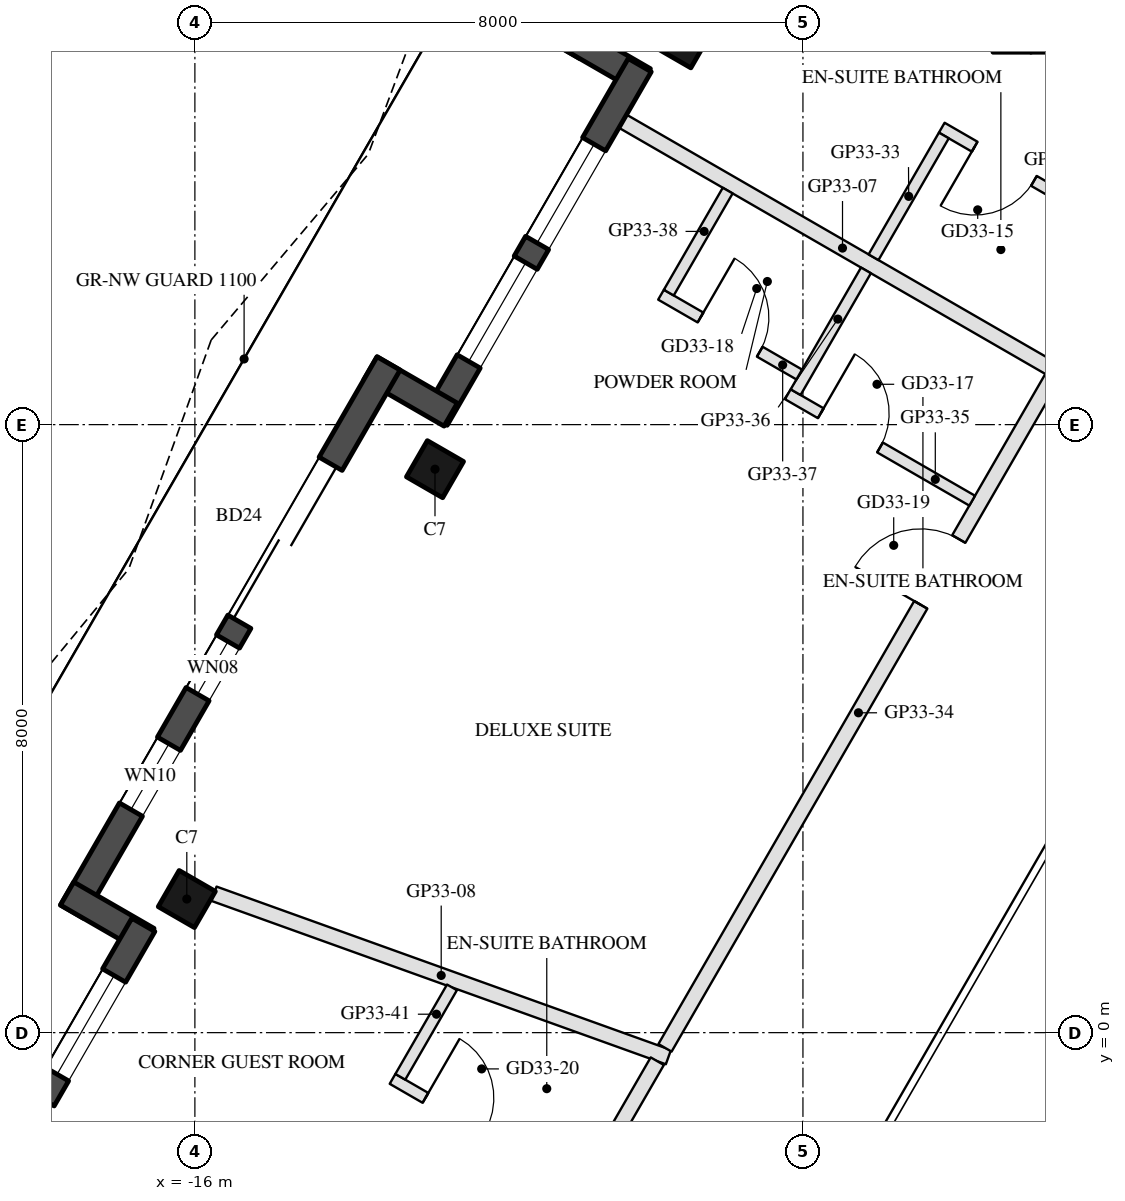
"""IFC4 building model, lengths in metres.
Left out: names, types, materials, properties, quantities, classifications, styles, units other than length and angle.
Written with IfcOpenShell. Run it as: python <this file> out.ifc"""

import sys

from ifc_helpers import new_model, si_unit, direction, frame, frame_2d, origin, origin_2d, place, context, subcontext, project, spatial, rectangle, hollow_rectangle, extrude, boolean, halfspace, element, fill, save


model = new_model("IFC4")
c1 = context("Model", 3, precision=1e-05, world=origin(), true_north=direction((0.0, 1.0)))
c2 = subcontext(c1, "Body", "Model", "MODEL_VIEW")
j1 = project(units=[si_unit("LENGTHUNIT", "METRE"), si_unit("PLANEANGLEUNIT", "RADIAN")], contexts=[c1])
p1 = place(None, origin())
s1 = spatial("IfcSite", under=j1, at=p1, CompositionType="ELEMENT")
p2 = place(p1, origin())
s2 = spatial("IfcBuilding", under=s1, at=p2, CompositionType="ELEMENT")
p3 = place(p2, frame((0.0, 0.0, 313.3)))
s3 = spatial("IfcBuildingStorey", under=s2, at=p3, CompositionType="ELEMENT", Elevation=313.3)
p4 = place(p3, frame((-9.576, 13.07, 0.0), z_axis=(0.0, 0.0, 1.0), x_axis=(0.5, 0.866025403784, 0.0)))
e1 = element("IfcColumn", 1, at=p4, inside=s3, PredefinedType="COLUMN", context=c2, shape_type="SweptSolid", body=[
    boolean("DIFFERENCE", extrude(hollow_rectangle(XDim=0.55, YDim=0.55, WallThickness=0.025, at=origin_2d()), origin(), (0.0, 0.0, 1.0), 3.7), halfspace(frame((0.0, 0.0, 0.034), z_axis=(0.0, 0.0, 1.0), x_axis=(1.0, 0.0, 0.0)), True)),
])
p5 = place(p3, frame((-12.841, 7.414, 0.0), z_axis=(0.0, 0.0, 1.0), x_axis=(0.5, 0.866025403784, 0.0)))
e2 = element("IfcColumn", 2, at=p5, inside=s3, PredefinedType="COLUMN", context=c2, shape_type="SweptSolid", body=[
    boolean("DIFFERENCE", extrude(hollow_rectangle(XDim=0.55, YDim=0.55, WallThickness=0.025, at=origin_2d()), origin(), (0.0, 0.0, 1.0), 3.7), halfspace(frame((0.0, 0.0, 0.031), z_axis=(0.0, 0.0, 1.0), x_axis=(1.0, 0.0, 0.0)), True)),
])
p6 = place(p3, frame((-16.106, 1.758, 0.0), z_axis=(0.0, 0.0, 1.0), x_axis=(0.5, 0.866025403784, 0.0)))
e3 = element("IfcColumn", 3, at=p6, inside=s3, PredefinedType="COLUMN", context=c2, shape_type="SweptSolid", body=[
    boolean("DIFFERENCE", extrude(hollow_rectangle(XDim=0.55, YDim=0.55, WallThickness=0.025, at=origin_2d()), origin(), (0.0, 0.0, 1.0), 3.7), halfspace(frame((0.0, 0.0, 0.034), z_axis=(0.0, 0.0, 1.0), x_axis=(1.0, 0.0, 0.0)), True)),
])
p7 = place(p3, frame((-6.125, 21.497, 0.0), z_axis=(0.0, 0.0, 1.0), x_axis=(-0.500002137087, -0.866024169933, 0.0)))
e4 = element("IfcWall", 4, at=p7, inside=s3, PredefinedType="SOLIDWALL", context=c2, shape_type="SweptSolid", body=[
    extrude(rectangle(XDim=9.924, YDim=0.35, at=frame_2d((4.962, 0.0))), origin(), (0.0, 0.0, 1.0), 3.55),
])
p8 = place(p7, frame((0.381, 0.0, 0.3)))
e5 = element("IfcOpeningElement", 5, at=p8, cuts=e4, PredefinedType="OPENING", context=c2, shape_type="SweptSolid", body=[
    extrude(rectangle(XDim=1.4, YDim=2.65, at=frame_2d((0.7, 1.325))), frame((0.0, 0.185, 0.0), z_axis=(0.0, -1.0, 0.0), x_axis=(1.0, 0.0, 0.0)), (0.0, 0.0, 1.0), 0.37),
])
p9 = place(p7, frame((5.999, 0.0, 0.0)))
e6 = element("IfcOpeningElement", 6, at=p9, cuts=e4, PredefinedType="OPENING", context=c2, shape_type="SweptSolid", body=[
    extrude(rectangle(XDim=2.4, YDim=2.4, at=frame_2d((1.2, 1.2))), frame((0.0, 0.185, 0.0), z_axis=(0.0, -1.0, 0.0), x_axis=(1.0, 0.0, 0.0)), (0.0, 0.0, 1.0), 0.37),
])
p10 = place(p7, frame((3.118, 0.0, 0.3)))
e7 = element("IfcOpeningElement", 7, at=p10, cuts=e4, PredefinedType="OPENING", context=c2, shape_type="SweptSolid", body=[
    extrude(rectangle(XDim=2.5, YDim=2.65, at=frame_2d((1.25, 1.325))), frame((0.0, 0.185, 0.0), z_axis=(0.0, -1.0, 0.0), x_axis=(1.0, 0.0, 0.0)), (0.0, 0.0, 1.0), 0.37),
])
p11 = place(p3, frame((-11.151, 13.142, 0.0), z_axis=(0.0, 0.0, 1.0), x_axis=(0.866005645448, -0.500034220881, 0.0)))
e8 = element("IfcWall", 8, at=p11, inside=s3, PredefinedType="SOLIDWALL", context=c2, shape_type="SweptSolid", body=[
    extrude(rectangle(XDim=1.22, YDim=0.35, at=frame_2d((0.61, 0.0))), origin(), (0.0, 0.0, 1.0), 3.55),
])
p12 = place(p3, frame((-10.147, 12.73, 0.0), z_axis=(0.0, 0.0, 1.0), x_axis=(-0.499996591357, -0.866027371756, 0.0)))
e9 = element("IfcWall", 9, at=p12, inside=s3, PredefinedType="SOLIDWALL", context=c2, shape_type="SweptSolid", body=[
    extrude(rectangle(XDim=5.371, YDim=0.35, at=frame_2d((2.685, 0.0))), origin(), (0.0, 0.0, 1.0), 3.55),
])
p13 = place(p12, frame((1.201, 0.0, 0.3)))
e10 = element("IfcOpeningElement", 10, at=p13, cuts=e9, PredefinedType="OPENING", context=c2, shape_type="SweptSolid", body=[
    extrude(rectangle(XDim=1.5, YDim=2.65, at=frame_2d((0.75, 1.325))), frame((0.0, 0.185, 0.0), z_axis=(0.0, -1.0, 0.0), x_axis=(1.0, 0.0, 0.0)), (0.0, 0.0, 1.0), 0.37),
])
p14 = place(p12, frame((3.001, 0.0, 0.3)))
e11 = element("IfcOpeningElement", 11, at=p14, cuts=e9, PredefinedType="OPENING", context=c2, shape_type="SweptSolid", body=[
    extrude(rectangle(XDim=1.5, YDim=2.65, at=frame_2d((0.75, 1.325))), frame((0.0, 0.185, 0.0), z_axis=(0.0, -1.0, 0.0), x_axis=(1.0, 0.0, 0.0)), (0.0, 0.0, 1.0), 0.37),
])
p15 = place(p3, frame((-12.634, 8.132, 0.0), z_axis=(0.0, 0.0, 1.0), x_axis=(-0.866005645448, 0.500034220881, 0.0)))
e12 = element("IfcWall", 12, at=p15, inside=s3, PredefinedType="SOLIDWALL", context=c2, shape_type="SweptSolid", body=[
    extrude(rectangle(XDim=1.22, YDim=0.35, at=frame_2d((0.61, 0.0))), origin(), (0.0, 0.0, 1.0), 3.55),
])
p16 = place(p3, frame((-13.452, 8.806, 0.0), z_axis=(0.0, 0.0, 1.0), x_axis=(-0.499993893925, -0.8660289291, 0.0)))
e13 = element("IfcWall", 13, at=p16, inside=s3, PredefinedType="SOLIDWALL", context=c2, shape_type="SweptSolid", body=[
    extrude(rectangle(XDim=8.331, YDim=0.35, at=frame_2d((4.165, 0.0))), origin(), (0.0, 0.0, 1.0), 3.55),
])
p17 = place(p16, frame((1.525, 0.0, 0.0)))
e14 = element("IfcOpeningElement", 14, at=p17, cuts=e13, PredefinedType="OPENING", context=c2, shape_type="SweptSolid", body=[
    extrude(rectangle(XDim=2.4, YDim=2.4, at=frame_2d((1.2, 1.2))), frame((0.0, 0.185, 0.0), z_axis=(0.0, -1.0, 0.0), x_axis=(1.0, 0.0, 0.0)), (0.0, 0.0, 1.0), 0.37),
])
p18 = place(p16, frame((4.225, 0.0, 0.3)))
e15 = element("IfcOpeningElement", 15, at=p18, cuts=e13, PredefinedType="OPENING", context=c2, shape_type="SweptSolid", body=[
    extrude(rectangle(XDim=0.8, YDim=2.65, at=frame_2d((0.4, 1.325))), frame((0.0, 0.185, 0.0), z_axis=(0.0, -1.0, 0.0), x_axis=(1.0, 0.0, 0.0)), (0.0, 0.0, 1.0), 0.37),
])
p19 = place(p16, frame((5.779, 0.0, 0.3)))
e16 = element("IfcOpeningElement", 16, at=p19, cuts=e13, PredefinedType="OPENING", context=c2, shape_type="SweptSolid", body=[
    extrude(rectangle(XDim=1.0, YDim=2.65, at=frame_2d((0.5, 1.325))), frame((0.0, 0.185, 0.0), z_axis=(0.0, -1.0, 0.0), x_axis=(1.0, 0.0, 0.0)), (0.0, 0.0, 1.0), 0.37),
])
p20 = place(p3, frame((-17.681, 1.83, 0.0), z_axis=(0.0, 0.0, 1.0), x_axis=(0.866092288191, -0.499884134912, 0.0)))
e17 = element("IfcWall", 17, at=p20, inside=s3, PredefinedType="SOLIDWALL", context=c2, shape_type="SweptSolid", body=[
    extrude(rectangle(XDim=1.22, YDim=0.35, at=frame_2d((0.61, 0.0))), origin(), (0.0, 0.0, 1.0), 3.55),
])
p21 = place(p3, frame((-16.678, 1.418, 0.0), z_axis=(0.0, 0.0, 1.0), x_axis=(-0.499996591357, -0.866027371756, 0.0)))
e18 = element("IfcWall", 18, at=p21, inside=s3, PredefinedType="SOLIDWALL", context=c2, shape_type="SweptSolid", body=[
    extrude(rectangle(XDim=5.371, YDim=0.35, at=frame_2d((2.685, 0.0))), origin(), (0.0, 0.0, 1.0), 3.55),
])
p22 = place(p21, frame((2.651, 0.0, 0.0)))
e19 = element("IfcOpeningElement", 19, at=p22, cuts=e18, PredefinedType="OPENING", context=c2, shape_type="SweptSolid", body=[
    extrude(rectangle(XDim=2.4, YDim=2.4, at=frame_2d((1.2, 1.2))), frame((0.0, 0.185, 0.0), z_axis=(0.0, -1.0, 0.0), x_axis=(1.0, 0.0, 0.0)), (0.0, 0.0, 1.0), 0.37),
])
p23 = place(p21, frame((0.77, 0.0, 0.3)))
e20 = element("IfcOpeningElement", 20, at=p23, cuts=e18, PredefinedType="OPENING", context=c2, shape_type="SweptSolid", body=[
    extrude(rectangle(XDim=1.5, YDim=2.65, at=frame_2d((0.75, 1.325))), frame((0.0, 0.185, 0.0), z_axis=(0.0, -1.0, 0.0), x_axis=(1.0, 0.0, 0.0)), (0.0, 0.0, 1.0), 0.37),
])
p24 = place(p3, frame((-5.25, 12.9, 0.0), z_axis=(0.0, 0.0, 1.0), x_axis=(0.0, 1.0, 0.0)))
e21 = element("IfcWall", 21, at=p24, inside=s3, PredefinedType="SHEAR", context=c2, shape_type="SweptSolid", body=[
    extrude(rectangle(XDim=9.283, YDim=0.5, at=frame_2d((4.641, 0.0))), origin(), (0.0, 0.0, 1.0), 3.5),
])
p25 = place(p3, frame((5.0, 13.1, 0.0), z_axis=(0.0, 0.0, 1.0), x_axis=(-1.0, 0.0, 0.0)))
e22 = element("IfcWall", 22, at=p25, inside=s3, PredefinedType="SHEAR", context=c2, shape_type="SweptSolid", body=[
    extrude(rectangle(XDim=10.0, YDim=0.4, at=frame_2d((5.0, 0.0))), origin(), (0.0, 0.0, 1.0), 3.5),
])
p26 = place(p25, frame((3.55, 0.0, 0.0)))
e23 = element("IfcOpeningElement", 23, at=p26, cuts=e22, PredefinedType="OPENING", context=c2, shape_type="SweptSolid", body=[
    extrude(rectangle(XDim=1.1, YDim=2.1, at=frame_2d((0.55, 1.05))), frame((0.0, 0.21, 0.0), z_axis=(0.0, -1.0, 0.0), x_axis=(1.0, 0.0, 0.0)), (0.0, 0.0, 1.0), 0.42),
])
p27 = place(p25, frame((5.85, 0.0, 0.0)))
e24 = element("IfcOpeningElement", 24, at=p27, cuts=e22, PredefinedType="OPENING", context=c2, shape_type="SweptSolid", body=[
    extrude(rectangle(XDim=1.4, YDim=2.1, at=frame_2d((0.7, 1.05))), frame((0.0, 0.21, 0.0), z_axis=(0.0, -1.0, 0.0), x_axis=(1.0, 0.0, 0.0)), (0.0, 0.0, 1.0), 0.42),
])
p28 = place(p3, frame((-10.371, 11.992, 0.0), z_axis=(0.0, 0.0, 1.0), x_axis=(0.866020588255, -0.50000834065, 0.0)))
e25 = element("IfcWall", 25, at=p28, inside=s3, PredefinedType="PARTITIONING", context=c2, shape_type="SweptSolid", body=[
    extrude(rectangle(XDim=6.678, YDim=0.2, at=frame_2d((3.339, 0.0))), origin(), (0.0, 0.0, 1.0), 3.16),
])
p29 = place(p3, frame((-15.749, 1.827, 0.0), z_axis=(0.0, 0.0, 1.0), x_axis=(0.941030372408, -0.3383220924, 0.0)))
e26 = element("IfcWall", 26, at=p29, inside=s3, PredefinedType="PARTITIONING", context=c2, shape_type="SweptSolid", body=[
    extrude(rectangle(XDim=6.353, YDim=0.2, at=frame_2d((3.177, 0.0))), origin(), (0.0, 0.0, 1.0), 3.55),
])
p30 = place(p3, frame((-3.749, 10.507, 0.0), z_axis=(0.0, 0.0, 1.0), x_axis=(-0.866034573852, 0.49998411664, 0.0)))
e27 = element("IfcWall", 27, at=p30, inside=s3, PredefinedType="PARTITIONING", context=c2, shape_type="SweptSolid", body=[
    extrude(rectangle(XDim=2.8, YDim=0.15, at=frame_2d((1.4, 0.0))), origin(), (0.0, 0.0, 1.0), 3.55),
])
p31 = place(p30, frame((1.4, 0.0, 0.0)))
e28 = element("IfcOpeningElement", 28, at=p31, cuts=e27, PredefinedType="OPENING", context=c2, shape_type="SweptSolid", body=[
    extrude(rectangle(XDim=0.9, YDim=2.1, at=frame_2d((0.45, 1.05))), frame((0.0, 0.085, 0.0), z_axis=(0.0, -1.0, 0.0), x_axis=(1.0, 0.0, 0.0)), (0.0, 0.0, 1.0), 0.17),
])
p32 = place(p3, frame((-6.146, 11.805, 0.0), z_axis=(0.0, 0.0, 1.0), x_axis=(-0.499985172903, -0.866033964044, 0.0)))
e29 = element("IfcWall", 29, at=p32, inside=s3, PredefinedType="PARTITIONING", context=c2, shape_type="SweptSolid", body=[
    extrude(rectangle(XDim=1.85, YDim=0.15, at=frame_2d((0.925, 0.0))), origin(), (0.0, 0.0, 1.0), 3.1),
])
p33 = place(p3, frame((-9.815, -0.2, 0.0), z_axis=(0.0, 0.0, 1.0), x_axis=(0.499995091154, 0.866028237889, 0.0)))
e30 = element("IfcWall", 30, at=p33, inside=s3, PredefinedType="PARTITIONING", context=c2, shape_type="SweptSolid", body=[
    extrude(rectangle(XDim=10.18, YDim=0.2, at=frame_2d((5.09, 0.0))), origin(), (0.0, 0.0, 1.0), 3.1),
])
p34 = place(p33, frame((6.73, 0.0, 0.0)))
e31 = element("IfcOpeningElement", 31, at=p34, cuts=e30, PredefinedType="OPENING", context=c2, shape_type="SweptSolid", body=[
    extrude(rectangle(XDim=1.0, YDim=2.1, at=frame_2d((0.5, 1.05))), frame((0.0, 0.11, 0.0), z_axis=(0.0, -1.0, 0.0), x_axis=(1.0, 0.0, 0.0)), (0.0, 0.0, 1.0), 0.22),
])
p35 = place(p3, frame((-8.198, 8.4, 0.0), z_axis=(0.0, 0.0, 1.0), x_axis=(0.865996816683, -0.500049511043, 0.0)))
e32 = element("IfcWall", 32, at=p35, inside=s3, PredefinedType="PARTITIONING", context=c2, shape_type="SweptSolid", body=[
    extrude(rectangle(XDim=2.8, YDim=0.15, at=frame_2d((1.4, 0.0))), origin(), (0.0, 0.0, 1.0), 3.1),
])
p36 = place(p35, frame((0.5, 0.0, 0.0)))
e33 = element("IfcOpeningElement", 33, at=p36, cuts=e32, PredefinedType="OPENING", context=c2, shape_type="SweptSolid", body=[
    extrude(rectangle(XDim=0.9, YDim=2.1, at=frame_2d((0.45, 1.05))), frame((0.0, 0.085, 0.0), z_axis=(0.0, -1.0, 0.0), x_axis=(1.0, 0.0, 0.0)), (0.0, 0.0, 1.0), 0.17),
])
p37 = place(p3, frame((-7.171, 10.029, 0.0), z_axis=(0.0, 0.0, 1.0), x_axis=(-0.499985172903, -0.866033964044, 0.0)))
e34 = element("IfcWall", 34, at=p37, inside=s3, PredefinedType="PARTITIONING", context=c2, shape_type="SweptSolid", body=[
    extrude(rectangle(XDim=1.85, YDim=0.15, at=frame_2d((0.925, 0.0))), origin(), (0.0, 0.0, 1.0), 3.1),
])
p38 = place(p3, frame((-9.867, 9.709, 0.0), z_axis=(0.0, 0.0, 1.0), x_axis=(0.866009402589, -0.500027713859, 0.0)))
e35 = element("IfcWall", 35, at=p38, inside=s3, PredefinedType="PARTITIONING", context=c2, shape_type="SweptSolid", body=[
    extrude(rectangle(XDim=2.1, YDim=0.15, at=frame_2d((1.05, 0.0))), origin(), (0.0, 0.0, 1.0), 3.55),
])
p39 = place(p38, frame((0.6, 0.0, 0.0)))
e36 = element("IfcOpeningElement", 36, at=p39, cuts=e35, PredefinedType="OPENING", context=c2, shape_type="SweptSolid", body=[
    extrude(rectangle(XDim=0.9, YDim=2.1, at=frame_2d((0.45, 1.05))), frame((0.0, 0.085, 0.0), z_axis=(0.0, -1.0, 0.0), x_axis=(1.0, 0.0, 0.0)), (0.0, 0.0, 1.0), 0.17),
])
p40 = place(p3, frame((-8.99, 11.079, 0.0), z_axis=(0.0, 0.0, 1.0), x_axis=(-0.500086022567, -0.865975732936, 0.0)))
e37 = element("IfcWall", 37, at=p40, inside=s3, PredefinedType="PARTITIONING", context=c2, shape_type="SweptSolid", body=[
    extrude(rectangle(XDim=1.55, YDim=0.15, at=frame_2d((0.775, 0.0))), origin(), (0.0, 0.0, 1.0), 3.55),
])
p41 = place(p3, frame((-12.269, -4.45, 0.0), z_axis=(0.0, 0.0, 1.0), x_axis=(0.500006955494, 0.866021387991, 0.0)))
e38 = element("IfcWall", 38, at=p41, inside=s3, PredefinedType="PARTITIONING", context=c2, shape_type="SweptSolid", body=[
    extrude(rectangle(XDim=4.705, YDim=0.2, at=frame_2d((2.352, 0.0))), origin(), (0.0, 0.0, 1.0), 3.1),
])
p42 = place(p41, frame((1.237, 0.0, 0.0)))
e39 = element("IfcOpeningElement", 39, at=p42, cuts=e38, PredefinedType="OPENING", context=c2, shape_type="SweptSolid", body=[
    extrude(rectangle(XDim=1.0, YDim=2.1, at=frame_2d((0.5, 1.05))), frame((0.0, 0.11, 0.0), z_axis=(0.0, -1.0, 0.0), x_axis=(1.0, 0.0, 0.0)), (0.0, 0.0, 1.0), 0.22),
])
p43 = place(p3, frame((-13.399, -0.608, 0.0), z_axis=(0.0, 0.0, 1.0), x_axis=(0.866034573852, -0.49998411664, 0.0)))
e40 = element("IfcWall", 40, at=p43, inside=s3, PredefinedType="PARTITIONING", context=c2, shape_type="SweptSolid", body=[
    extrude(rectangle(XDim=2.8, YDim=0.15, at=frame_2d((1.4, 0.0))), origin(), (0.0, 0.0, 1.0), 3.55),
])
p44 = place(p43, frame((0.5, 0.0, 0.0)))
e41 = element("IfcOpeningElement", 41, at=p44, cuts=e40, PredefinedType="OPENING", context=c2, shape_type="SweptSolid", body=[
    extrude(rectangle(XDim=0.9, YDim=2.1, at=frame_2d((0.45, 1.05))), frame((0.0, 0.085, 0.0), z_axis=(0.0, -1.0, 0.0), x_axis=(1.0, 0.0, 0.0)), (0.0, 0.0, 1.0), 0.17),
])
p45 = place(p3, frame((-12.618, 0.595, 0.0), z_axis=(0.0, 0.0, 1.0), x_axis=(-0.499966175448, -0.866044931518, 0.0)))
e42 = element("IfcWall", 42, at=p45, inside=s3, PredefinedType="PARTITIONING", context=c2, shape_type="SweptSolid", body=[
    extrude(rectangle(XDim=1.358, YDim=0.15, at=frame_2d((0.679, 0.0))), origin(), (0.0, 0.0, 1.0), 3.1),
])
p46 = place(p13, origin())
e43 = element("IfcWindow", 43, at=p46, inside=s3, PartitioningType="SINGLE_PANEL", PredefinedType="WINDOW", context=c2, shape_type="SweptSolid", body=[
    extrude(rectangle(XDim=1.5, YDim=2.65, at=frame_2d((0.75, 1.325))), frame((0.0, 0.03, 0.0), z_axis=(0.0, -1.0, 0.0), x_axis=(1.0, 0.0, 0.0)), (0.0, 0.0, 1.0), 0.06),
])
fill(e10, e43)
p47 = place(p14, origin())
e44 = element("IfcWindow", 44, at=p47, inside=s3, PartitioningType="SINGLE_PANEL", PredefinedType="WINDOW", context=c2, shape_type="SweptSolid", body=[
    extrude(rectangle(XDim=1.5, YDim=2.65, at=frame_2d((0.75, 1.325))), frame((0.0, 0.03, 0.0), z_axis=(0.0, -1.0, 0.0), x_axis=(1.0, 0.0, 0.0)), (0.0, 0.0, 1.0), 0.06),
])
fill(e11, e44)
p48 = place(p17, frame((2.4, 0.0, 0.0), z_axis=(0.0, 0.0, 1.0), x_axis=(-1.0, 0.0, 0.0)))
e45 = element("IfcDoor", 45, at=p48, inside=s3, OperationType="SLIDING_TO_LEFT", PredefinedType="DOOR", context=c2, shape_type="SweptSolid", body=[
    extrude(rectangle(XDim=2.4, YDim=2.4, at=frame_2d((1.2, 1.2))), frame((0.0, 0.025, 0.0), z_axis=(0.0, -1.0, 0.0), x_axis=(1.0, 0.0, 0.0)), (0.0, 0.0, 1.0), 0.05),
])
fill(e14, e45)
p49 = place(p18, origin())
e46 = element("IfcWindow", 46, at=p49, inside=s3, PartitioningType="SINGLE_PANEL", PredefinedType="WINDOW", context=c2, shape_type="SweptSolid", body=[
    extrude(rectangle(XDim=0.8, YDim=2.65, at=frame_2d((0.4, 1.325))), frame((0.0, 0.03, 0.0), z_axis=(0.0, -1.0, 0.0), x_axis=(1.0, 0.0, 0.0)), (0.0, 0.0, 1.0), 0.06),
])
fill(e15, e46)
p50 = place(p19, origin())
e47 = element("IfcWindow", 47, at=p50, inside=s3, PartitioningType="SINGLE_PANEL", PredefinedType="WINDOW", context=c2, shape_type="SweptSolid", body=[
    extrude(rectangle(XDim=1.0, YDim=2.65, at=frame_2d((0.5, 1.325))), frame((0.0, 0.03, 0.0), z_axis=(0.0, -1.0, 0.0), x_axis=(1.0, 0.0, 0.0)), (0.0, 0.0, 1.0), 0.06),
])
fill(e16, e47)
p51 = place(p23, origin())
e48 = element("IfcWindow", 48, at=p51, inside=s3, PartitioningType="SINGLE_PANEL", PredefinedType="WINDOW", context=c2, shape_type="SweptSolid", body=[
    extrude(rectangle(XDim=1.5, YDim=2.65, at=frame_2d((0.75, 1.325))), frame((0.0, 0.03, 0.0), z_axis=(0.0, -1.0, 0.0), x_axis=(1.0, 0.0, 0.0)), (0.0, 0.0, 1.0), 0.06),
])
fill(e20, e48)
p52 = place(p31, origin())
e49 = element("IfcDoor", 49, at=p52, inside=s3, OperationType="SINGLE_SWING_RIGHT", PredefinedType="DOOR", context=c2, shape_type="SweptSolid", body=[
    extrude(rectangle(XDim=0.9, YDim=2.1, at=frame_2d((0.45, 1.05))), frame((0.0, 0.025, 0.0), z_axis=(0.0, -1.0, 0.0), x_axis=(1.0, 0.0, 0.0)), (0.0, 0.0, 1.0), 0.05),
])
fill(e28, e49)
p53 = place(p36, origin())
e50 = element("IfcDoor", 50, at=p53, inside=s3, OperationType="SINGLE_SWING_LEFT", PredefinedType="DOOR", context=c2, shape_type="SweptSolid", body=[
    extrude(rectangle(XDim=0.9, YDim=2.1, at=frame_2d((0.45, 1.05))), frame((0.0, 0.025, 0.0), z_axis=(0.0, -1.0, 0.0), x_axis=(1.0, 0.0, 0.0)), (0.0, 0.0, 1.0), 0.05),
])
fill(e33, e50)
p54 = place(p39, origin())
e51 = element("IfcDoor", 51, at=p54, inside=s3, OperationType="SINGLE_SWING_LEFT", PredefinedType="DOOR", context=c2, shape_type="SweptSolid", body=[
    extrude(rectangle(XDim=0.9, YDim=2.1, at=frame_2d((0.45, 1.05))), frame((0.0, 0.025, 0.0), z_axis=(0.0, -1.0, 0.0), x_axis=(1.0, 0.0, 0.0)), (0.0, 0.0, 1.0), 0.05),
])
fill(e36, e51)
p55 = place(p34, origin())
e52 = element("IfcDoor", 52, at=p55, inside=s3, OperationType="SINGLE_SWING_LEFT", PredefinedType="DOOR", context=c2, shape_type="SweptSolid", body=[
    extrude(rectangle(XDim=1.0, YDim=2.1, at=frame_2d((0.5, 1.05))), frame((0.0, 0.025, 0.0), z_axis=(0.0, -1.0, 0.0), x_axis=(1.0, 0.0, 0.0)), (0.0, 0.0, 1.0), 0.05),
])
fill(e31, e52)
p56 = place(p44, origin())
e53 = element("IfcDoor", 53, at=p56, inside=s3, OperationType="SINGLE_SWING_LEFT", PredefinedType="DOOR", context=c2, shape_type="SweptSolid", body=[
    extrude(rectangle(XDim=0.9, YDim=2.1, at=frame_2d((0.45, 1.05))), frame((0.0, 0.025, 0.0), z_axis=(0.0, -1.0, 0.0), x_axis=(1.0, 0.0, 0.0)), (0.0, 0.0, 1.0), 0.05),
])
fill(e41, e53)
save(model, sys.argv[1])
